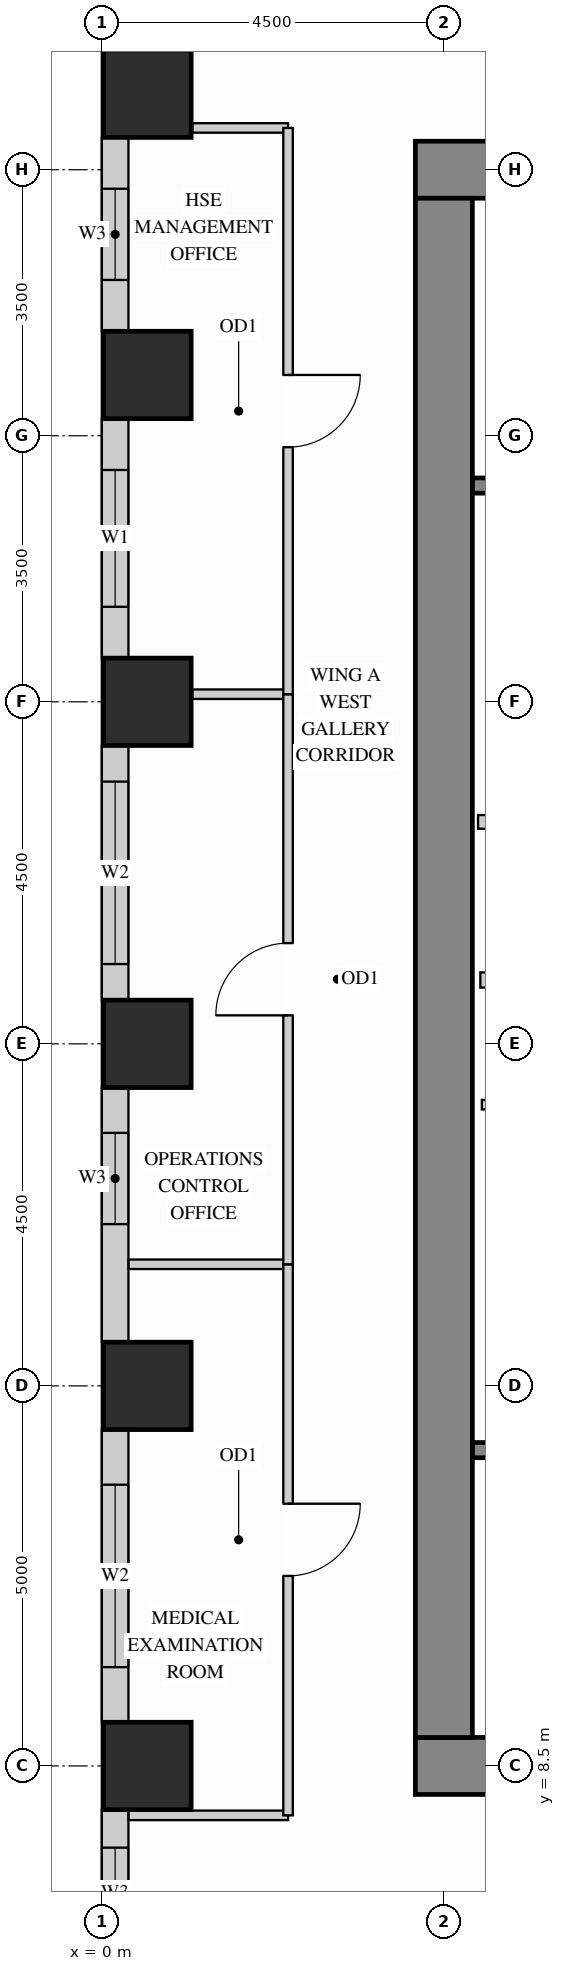
"""IFC4 building model, lengths in metres.
Left out: names, types, materials, properties, quantities, classifications, styles, units other than length and angle.
Written with IfcOpenShell. Run it as: python <this file> out.ifc"""

import sys

from ifc_helpers import new_model, si_unit, direction, frame, frame_2d, origin, origin_2d, place, context, subcontext, project, spatial, rectangle, extrude, source, transform, mapped, element, fill, save


model = new_model("IFC4")
c1 = context("Model", 3, precision=1e-05, world=origin(), true_north=direction((0.0, 1.0)))
c2 = subcontext(c1, "Body", "Model", "MODEL_VIEW")
j1 = project(units=[si_unit("LENGTHUNIT", "METRE"), si_unit("PLANEANGLEUNIT", "RADIAN")], contexts=[c1])
p1 = place(None, origin())
s1 = spatial("IfcSite", under=j1, at=p1, CompositionType="ELEMENT")
p2 = place(p1, origin())
s2 = spatial("IfcBuilding", under=s1, at=p2, CompositionType="ELEMENT")
p3 = place(p2, frame((0.0, 0.0, 117.0)))
s3 = spatial("IfcBuildingStorey", under=s2, at=p3, CompositionType="ELEMENT", Elevation=117.0)
m1 = source(origin(), c2, "Body", "SweptSolid", [
    extrude(rectangle(XDim=1.15, YDim=1.15, at=origin_2d()), origin(), (0.0, 0.0, 1.0), 3.38),
])
for number, where, z_axis, x_axis in (
    (1, (0.6, 13.5, 0.0), (0.0, 0.0, 1.0), (1.0, 0.0, 0.0)),
    (2, (0.6, 18.0, 0.0), (0.0, 0.0, 1.0), (1.0, 0.0, 0.0)),
    (3, (0.6, 22.5, 0.0), (0.0, 0.0, 1.0), (1.0, 0.0, 0.0)),
    (4, (0.6, 26.8, 0.0), (0.0, 0.0, 1.0), (1.0, 0.0, 0.0)),
    (5, (0.6, 30.5, 0.0), (0.0, 0.0, 1.0), (1.0, 0.0, 0.0)),
    (6, (0.6, 8.5, 0.0), (0.0, 0.0, 1.0), (1.0, 0.0, 0.0)),
):
    element("IfcColumn", number, at=place(p3, frame(where, z_axis=z_axis, x_axis=x_axis)), inside=s3, PredefinedType="COLUMN", context=c2, shape_type="MappedRepresentation", body=[
        mapped(m1, transform((0.0, 0.0, 0.0), x_axis=(1.0, 0.0, 0.0), y_axis=(0.0, 1.0, 0.0), z_axis=(0.0, 0.0, 1.0))),
    ])
m2 = source(origin(), c2, "Body", "SweptSolid", [
    extrude(rectangle(XDim=10.75, YDim=0.75, at=frame_2d((5.375, 0.0))), origin(), (0.0, 0.0, 1.0), 3.38),
])
for number, where, z_axis, x_axis in (
    (7, (4.125, 29.5, 0.0), (0.0, 0.0, 1.0), (1.0, 0.0, 0.0)),
    (8, (4.125, 8.5, 0.0), (0.0, 0.0, 1.0), (1.0, 0.0, 0.0)),
):
    element("IfcWall", number, at=place(p3, frame(where, z_axis=z_axis, x_axis=x_axis)), inside=s3, PredefinedType="SHEAR", context=c2, shape_type="MappedRepresentation", body=[
        mapped(m2, transform((0.0, 0.0, 0.0), x_axis=(1.0, 0.0, 0.0), y_axis=(0.0, 1.0, 0.0), z_axis=(0.0, 0.0, 1.0))),
    ])
m3 = source(origin(), c2, "Body", "SweptSolid", [
    extrude(rectangle(XDim=20.25, YDim=0.75, at=frame_2d((10.125, 0.0))), origin(), (0.0, 0.0, 1.0), 3.38),
])
p4 = place(p3, frame((4.5, 8.875, 0.0), z_axis=(0.0, 0.0, 1.0), x_axis=(0.0, 1.0, 0.0)))
e9 = element("IfcWall", 9, at=p4, inside=s3, PredefinedType="SHEAR", context=c2, shape_type="MappedRepresentation", body=[
    mapped(m3, transform((0.0, 0.0, 0.0), x_axis=(1.0, 0.0, 0.0), y_axis=(0.0, 1.0, 0.0), z_axis=(0.0, 0.0, 1.0))),
])
p5 = place(p3, frame((0.175, 29.927, 0.0), z_axis=(0.0, 0.0, 1.0), x_axis=(0.0, -1.0, 0.0)))
e10 = element("IfcWall", 10, at=p5, inside=s3, PredefinedType="SOLIDWALL", context=c2, shape_type="SweptSolid", body=[
    extrude(rectangle(XDim=2.554, YDim=0.35, at=frame_2d((1.277, 0.0))), origin(), (0.0, 0.0, 1.0), 3.365),
])
p6 = place(p5, frame((0.677, 0.0, 0.78)))
e11 = element("IfcOpeningElement", 11, at=p6, cuts=e10, PredefinedType="OPENING", context=c2, shape_type="SweptSolid", body=[
    extrude(rectangle(XDim=1.2, YDim=2.1, at=frame_2d((0.6, 1.05))), frame((0.0, 0.185, 0.0), z_axis=(0.0, -1.0, 0.0), x_axis=(1.0, 0.0, 0.0)), (0.0, 0.0, 1.0), 0.37),
])
p7 = place(p3, frame((0.175, 26.227, 0.0), z_axis=(0.0, 0.0, 1.0), x_axis=(0.0, -1.0, 0.0)))
e12 = element("IfcWall", 12, at=p7, inside=s3, PredefinedType="SOLIDWALL", context=c2, shape_type="SweptSolid", body=[
    extrude(rectangle(XDim=3.154, YDim=0.35, at=frame_2d((1.577, 0.0))), origin(), (0.0, 0.0, 1.0), 3.365),
])
p8 = place(p7, frame((0.677, 0.0, 0.78)))
e13 = element("IfcOpeningElement", 13, at=p8, cuts=e12, PredefinedType="OPENING", context=c2, shape_type="SweptSolid", body=[
    extrude(rectangle(XDim=1.8, YDim=2.1, at=frame_2d((0.9, 1.05))), frame((0.0, 0.185, 0.0), z_axis=(0.0, -1.0, 0.0), x_axis=(1.0, 0.0, 0.0)), (0.0, 0.0, 1.0), 0.37),
])
p9 = place(p3, frame((0.175, 21.927, 0.0), z_axis=(0.0, 0.0, 1.0), x_axis=(0.0, -1.0, 0.0)))
e14 = element("IfcWall", 14, at=p9, inside=s3, PredefinedType="SOLIDWALL", context=c2, shape_type="SweptSolid", body=[
    extrude(rectangle(XDim=3.354, YDim=0.35, at=frame_2d((1.677, 0.0))), origin(), (0.0, 0.0, 1.0), 3.365),
])
p10 = place(p9, frame((0.477, 0.0, 0.78)))
e15 = element("IfcOpeningElement", 15, at=p10, cuts=e14, PredefinedType="OPENING", context=c2, shape_type="SweptSolid", body=[
    extrude(rectangle(XDim=2.4, YDim=2.1, at=frame_2d((1.2, 1.05))), frame((0.0, 0.185, 0.0), z_axis=(0.0, -1.0, 0.0), x_axis=(1.0, 0.0, 0.0)), (0.0, 0.0, 1.0), 0.37),
])
p11 = place(p3, frame((0.175, 17.427, 0.0), z_axis=(0.0, 0.0, 1.0), x_axis=(0.0, -1.0, 0.0)))
e16 = element("IfcWall", 16, at=p11, inside=s3, PredefinedType="SOLIDWALL", context=c2, shape_type="SweptSolid", body=[
    extrude(rectangle(XDim=3.354, YDim=0.35, at=frame_2d((1.677, 0.0))), origin(), (0.0, 0.0, 1.0), 3.365),
])
p12 = place(p11, frame((0.598, 0.0, 0.78)))
e17 = element("IfcOpeningElement", 17, at=p12, cuts=e16, PredefinedType="OPENING", context=c2, shape_type="SweptSolid", body=[
    extrude(rectangle(XDim=1.2, YDim=2.1, at=frame_2d((0.6, 1.05))), frame((0.0, 0.185, 0.0), z_axis=(0.0, -1.0, 0.0), x_axis=(1.0, 0.0, 0.0)), (0.0, 0.0, 1.0), 0.37),
])
p13 = place(p3, frame((0.175, 12.927, 0.0), z_axis=(0.0, 0.0, 1.0), x_axis=(0.0, -1.0, 0.0)))
e18 = element("IfcWall", 18, at=p13, inside=s3, PredefinedType="SOLIDWALL", context=c2, shape_type="SweptSolid", body=[
    extrude(rectangle(XDim=3.854, YDim=0.35, at=frame_2d((1.927, 0.0))), origin(), (0.0, 0.0, 1.0), 3.365),
])
p14 = place(p13, frame((0.727, 0.0, 0.78)))
e19 = element("IfcOpeningElement", 19, at=p14, cuts=e18, PredefinedType="OPENING", context=c2, shape_type="SweptSolid", body=[
    extrude(rectangle(XDim=2.4, YDim=2.1, at=frame_2d((1.2, 1.05))), frame((0.0, 0.185, 0.0), z_axis=(0.0, -1.0, 0.0), x_axis=(1.0, 0.0, 0.0)), (0.0, 0.0, 1.0), 0.37),
])
p15 = place(p3, frame((0.175, 7.927, 0.0), z_axis=(0.0, 0.0, 1.0), x_axis=(0.0, -1.0, 0.0)))
e20 = element("IfcWall", 20, at=p15, inside=s3, PredefinedType="SOLIDWALL", context=c2, shape_type="SweptSolid", body=[
    extrude(rectangle(XDim=3.854, YDim=0.35, at=frame_2d((1.927, 0.0))), origin(), (0.0, 0.0, 1.0), 3.365),
])
p16 = place(p15, frame((0.502, 0.0, 0.78)))
e21 = element("IfcOpeningElement", 21, at=p16, cuts=e20, PredefinedType="OPENING", context=c2, shape_type="SweptSolid", body=[
    extrude(rectangle(XDim=1.2, YDim=2.1, at=frame_2d((0.6, 1.05))), frame((0.0, 0.185, 0.0), z_axis=(0.0, -1.0, 0.0), x_axis=(1.0, 0.0, 0.0)), (0.0, 0.0, 1.0), 0.37),
])
m4 = source(origin(), c2, "Body", "SweptSolid", [
    extrude(rectangle(XDim=2.2, YDim=0.18, at=frame_2d((1.1, 0.0))), origin(), (0.0, 0.0, 1.0), 3.365),
])
p17 = place(p3, frame((4.95, 20.92, 0.0), z_axis=(0.0, 0.0, 1.0), x_axis=(1.0, 0.0, 0.0)))
e22 = element("IfcWall", 22, at=p17, inside=s3, PredefinedType="PARTITIONING", context=c2, shape_type="MappedRepresentation", body=[
    mapped(m4, transform((0.0, 0.0, 0.0), x_axis=(1.0, 0.0, 0.0), y_axis=(0.0, 1.0, 0.0), z_axis=(0.0, 0.0, 1.0))),
])
p18 = place(p3, frame((5.0, 17.2, 0.0), z_axis=(0.0, 0.0, 1.0), x_axis=(1.0, 0.0, 0.0)))
e23 = element("IfcWall", 23, at=p18, inside=s3, PredefinedType="PARTITIONING", context=c2, shape_type="SweptSolid", body=[
    extrude(rectangle(XDim=2.4, YDim=0.125, at=frame_2d((1.2, 0.0))), origin(), (0.0, 0.0, 1.0), 3.365),
])
p19 = place(p18, frame((0.7, 0.0, 0.0)))
e24 = element("IfcOpeningElement", 24, at=p19, cuts=e23, PredefinedType="OPENING", context=c2, shape_type="SweptSolid", body=[
    extrude(rectangle(XDim=0.85, YDim=2.1, at=frame_2d((0.425, 1.05))), frame((0.0, 0.073, 0.0), z_axis=(0.0, -1.0, 0.0), x_axis=(1.0, 0.0, 0.0)), (0.0, 0.0, 1.0), 0.145),
])
m5 = source(origin(), c2, "Body", "SweptSolid", [
    extrude(rectangle(XDim=1.26, YDim=0.125, at=frame_2d((0.63, 0.0))), origin(), (0.0, 0.0, 1.0), 3.365),
])
p20 = place(p3, frame((1.19, 30.05, 0.0), z_axis=(0.0, 0.0, 1.0), x_axis=(1.0, 0.0, 0.0)))
e25 = element("IfcWall", 25, at=p20, inside=s3, PredefinedType="PARTITIONING", context=c2, shape_type="MappedRepresentation", body=[
    mapped(m5, transform((0.0, 0.0, 0.0), x_axis=(1.0, 0.0, 0.0), y_axis=(0.0, 1.0, 0.0), z_axis=(0.0, 0.0, 1.0))),
])
m6 = source(origin(), c2, "Body", "SweptSolid", [
    extrude(rectangle(XDim=2.098, YDim=0.125, at=frame_2d((1.049, 0.0))), origin(), (0.0, 0.0, 1.0), 3.365),
])
for number, where, z_axis, x_axis in (
    (26, (0.352, 7.85, 0.0), (0.0, 0.0, 1.0), (1.0, 0.0, 0.0)),
    (27, (0.352, 15.1, 0.0), (0.0, 0.0, 1.0), (1.0, 0.0, 0.0)),
):
    element("IfcWall", number, at=place(p3, frame(where, z_axis=z_axis, x_axis=x_axis)), inside=s3, PredefinedType="PARTITIONING", context=c2, shape_type="MappedRepresentation", body=[
        mapped(m6, transform((0.0, 0.0, 0.0), x_axis=(1.0, 0.0, 0.0), y_axis=(0.0, 1.0, 0.0), z_axis=(0.0, 0.0, 1.0))),
    ])
p21 = place(p3, frame((1.19, 22.6, 0.0), z_axis=(0.0, 0.0, 1.0), x_axis=(1.0, 0.0, 0.0)))
e28 = element("IfcWall", 28, at=p21, inside=s3, PredefinedType="PARTITIONING", context=c2, shape_type="MappedRepresentation", body=[
    mapped(m5, transform((0.0, 0.0, 0.0), x_axis=(1.0, 0.0, 0.0), y_axis=(0.0, 1.0, 0.0), z_axis=(0.0, 0.0, 1.0))),
])
p22 = place(p3, frame((2.45, 7.85, 0.0), z_axis=(0.0, 0.0, 1.0), x_axis=(0.0, 1.0, 0.0)))
e29 = element("IfcWall", 29, at=p22, inside=s3, PredefinedType="PARTITIONING", context=c2, shape_type="SweptSolid", body=[
    extrude(rectangle(XDim=7.25, YDim=0.125, at=frame_2d((3.625, 0.0))), origin(), (0.0, 0.0, 1.0), 3.365),
])
p23 = place(p22, frame((3.15, 0.0, 0.0)))
e30 = element("IfcOpeningElement", 30, at=p23, cuts=e29, PredefinedType="OPENING", context=c2, shape_type="SweptSolid", body=[
    extrude(rectangle(XDim=0.95, YDim=2.15, at=frame_2d((0.475, 1.075))), frame((0.0, 0.073, 0.0), z_axis=(0.0, -1.0, 0.0), x_axis=(1.0, 0.0, 0.0)), (0.0, 0.0, 1.0), 0.145),
])
p24 = place(p3, frame((2.45, 15.1, 0.0), z_axis=(0.0, 0.0, 1.0), x_axis=(0.0, 1.0, 0.0)))
e31 = element("IfcWall", 31, at=p24, inside=s3, PredefinedType="PARTITIONING", context=c2, shape_type="SweptSolid", body=[
    extrude(rectangle(XDim=7.5, YDim=0.125, at=frame_2d((3.75, 0.0))), origin(), (0.0, 0.0, 1.0), 3.365),
])
p25 = place(p24, frame((3.275, 0.0, 0.0)))
e32 = element("IfcOpeningElement", 32, at=p25, cuts=e31, PredefinedType="OPENING", context=c2, shape_type="SweptSolid", body=[
    extrude(rectangle(XDim=0.95, YDim=2.15, at=frame_2d((0.475, 1.075))), frame((0.0, 0.073, 0.0), z_axis=(0.0, -1.0, 0.0), x_axis=(1.0, 0.0, 0.0)), (0.0, 0.0, 1.0), 0.145),
])
p26 = place(p3, frame((2.45, 22.6, 0.0), z_axis=(0.0, 0.0, 1.0), x_axis=(0.0, 1.0, 0.0)))
e33 = element("IfcWall", 33, at=p26, inside=s3, PredefinedType="PARTITIONING", context=c2, shape_type="SweptSolid", body=[
    extrude(rectangle(XDim=7.45, YDim=0.125, at=frame_2d((3.725, 0.0))), origin(), (0.0, 0.0, 1.0), 3.365),
])
p27 = place(p26, frame((3.25, 0.0, 0.0)))
e34 = element("IfcOpeningElement", 34, at=p27, cuts=e33, PredefinedType="OPENING", context=c2, shape_type="SweptSolid", body=[
    extrude(rectangle(XDim=0.95, YDim=2.15, at=frame_2d((0.475, 1.075))), frame((0.0, 0.073, 0.0), z_axis=(0.0, -1.0, 0.0), x_axis=(1.0, 0.0, 0.0)), (0.0, 0.0, 1.0), 0.145),
])
m7 = source(origin(), c2, "Body", "SweptSolid", [
    extrude(rectangle(XDim=2.09, YDim=0.2, at=frame_2d((1.045, 0.0))), origin(), (0.0, 0.0, 1.0), 3.365),
])
p28 = place(p3, frame((4.98, 18.84, 0.0), z_axis=(0.0, 0.0, 1.0), x_axis=(1.0, 0.0, 0.0)))
e35 = element("IfcWall", 35, at=p28, inside=s3, PredefinedType="PARTITIONING", context=c2, shape_type="MappedRepresentation", body=[
    mapped(m7, transform((0.0, 0.0, 0.0), x_axis=(1.0, 0.0, 0.0), y_axis=(0.0, 1.0, 0.0), z_axis=(0.0, 0.0, 1.0))),
])
p29 = place(p3, frame((4.877, 12.655, 0.0), z_axis=(0.0, 0.0, 1.0), x_axis=(1.0, 0.0, 0.0)))
e36 = element("IfcWall", 36, at=p29, inside=s3, PredefinedType="SHEAR", context=c2, shape_type="SweptSolid", body=[
    extrude(rectangle(XDim=7.528, YDim=0.2, at=frame_2d((3.764, 0.0))), origin(), (0.0, 0.0, 1.0), 3.38),
])
p30 = place(p29, frame((0.4, 0.0, 0.0)))
e37 = element("IfcOpeningElement", 37, at=p30, cuts=e36, PredefinedType="OPENING", context=c2, shape_type="SweptSolid", body=[
    extrude(rectangle(XDim=1.1, YDim=2.15, at=frame_2d((0.55, 1.075))), frame((0.0, 0.11, 0.0), z_axis=(0.0, -1.0, 0.0), x_axis=(1.0, 0.0, 0.0)), (0.0, 0.0, 1.0), 0.22),
])
p31 = place(p3, frame((4.877, 25.345, 0.0), z_axis=(0.0, 0.0, 1.0), x_axis=(1.0, 0.0, 0.0)))
e38 = element("IfcWall", 38, at=p31, inside=s3, PredefinedType="SHEAR", context=c2, shape_type="SweptSolid", body=[
    extrude(rectangle(XDim=7.528, YDim=0.2, at=frame_2d((3.764, 0.0))), origin(), (0.0, 0.0, 1.0), 3.38),
])
p32 = place(p31, frame((0.4, 0.0, 0.0)))
e39 = element("IfcOpeningElement", 39, at=p32, cuts=e38, PredefinedType="OPENING", context=c2, shape_type="SweptSolid", body=[
    extrude(rectangle(XDim=1.1, YDim=2.15, at=frame_2d((0.55, 1.075))), frame((0.0, 0.11, 0.0), z_axis=(0.0, -1.0, 0.0), x_axis=(1.0, 0.0, 0.0)), (0.0, 0.0, 1.0), 0.22),
])
m8 = source(origin(), c2, "Body", "SweptSolid", [
    extrude(rectangle(XDim=0.95, YDim=2.15, at=frame_2d((0.475, 1.075))), frame((0.0, 0.025, 0.0), z_axis=(0.0, -1.0, 0.0), x_axis=(1.0, 0.0, 0.0)), (0.0, 0.0, 1.0), 0.05),
])
p33 = place(p23, origin())
e40 = element("IfcDoor", 40, at=p33, inside=s3, OperationType="SINGLE_SWING_RIGHT", PredefinedType="DOOR", context=c2, shape_type="MappedRepresentation", body=[
    mapped(m8, transform((0.0, 0.0, 0.0), x_axis=(1.0, 0.0, 0.0), y_axis=(0.0, 1.0, 0.0), z_axis=(0.0, 0.0, 1.0))),
])
fill(e30, e40)
p34 = place(p25, origin())
e41 = element("IfcDoor", 41, at=p34, inside=s3, OperationType="SINGLE_SWING_LEFT", PredefinedType="DOOR", context=c2, shape_type="MappedRepresentation", body=[
    mapped(m8, transform((0.0, 0.0, 0.0), x_axis=(1.0, 0.0, 0.0), y_axis=(0.0, 1.0, 0.0), z_axis=(0.0, 0.0, 1.0))),
])
fill(e32, e41)
p35 = place(p27, origin())
e42 = element("IfcDoor", 42, at=p35, inside=s3, OperationType="SINGLE_SWING_RIGHT", PredefinedType="DOOR", context=c2, shape_type="MappedRepresentation", body=[
    mapped(m8, transform((0.0, 0.0, 0.0), x_axis=(1.0, 0.0, 0.0), y_axis=(0.0, 1.0, 0.0), z_axis=(0.0, 0.0, 1.0))),
])
fill(e34, e42)
m9 = source(origin(), c2, "Body", "SweptSolid", [
    extrude(rectangle(XDim=1.8, YDim=2.1, at=frame_2d((0.9, 1.05))), frame((0.0, 0.03, 0.0), z_axis=(0.0, -1.0, 0.0), x_axis=(1.0, 0.0, 0.0)), (0.0, 0.0, 1.0), 0.06),
])
p36 = place(p8, origin())
e43 = element("IfcWindow", 43, at=p36, inside=s3, PartitioningType="SINGLE_PANEL", PredefinedType="WINDOW", context=c2, shape_type="MappedRepresentation", body=[
    mapped(m9, transform((0.0, 0.0, 0.0), x_axis=(1.0, 0.0, 0.0), y_axis=(0.0, 1.0, 0.0), z_axis=(0.0, 0.0, 1.0))),
])
fill(e13, e43)
m10 = source(origin(), c2, "Body", "SweptSolid", [
    extrude(rectangle(XDim=2.4, YDim=2.1, at=frame_2d((1.2, 1.05))), frame((0.0, 0.03, 0.0), z_axis=(0.0, -1.0, 0.0), x_axis=(1.0, 0.0, 0.0)), (0.0, 0.0, 1.0), 0.06),
])
p37 = place(p10, origin())
e44 = element("IfcWindow", 44, at=p37, inside=s3, PartitioningType="SINGLE_PANEL", PredefinedType="WINDOW", context=c2, shape_type="MappedRepresentation", body=[
    mapped(m10, transform((0.0, 0.0, 0.0), x_axis=(1.0, 0.0, 0.0), y_axis=(0.0, 1.0, 0.0), z_axis=(0.0, 0.0, 1.0))),
])
fill(e15, e44)
p38 = place(p14, origin())
e45 = element("IfcWindow", 45, at=p38, inside=s3, PartitioningType="SINGLE_PANEL", PredefinedType="WINDOW", context=c2, shape_type="MappedRepresentation", body=[
    mapped(m10, transform((0.0, 0.0, 0.0), x_axis=(1.0, 0.0, 0.0), y_axis=(0.0, 1.0, 0.0), z_axis=(0.0, 0.0, 1.0))),
])
fill(e19, e45)
m11 = source(origin(), c2, "Body", "SweptSolid", [
    extrude(rectangle(XDim=1.2, YDim=2.1, at=frame_2d((0.6, 1.05))), frame((0.0, 0.03, 0.0), z_axis=(0.0, -1.0, 0.0), x_axis=(1.0, 0.0, 0.0)), (0.0, 0.0, 1.0), 0.06),
])
p39 = place(p6, origin())
e46 = element("IfcWindow", 46, at=p39, inside=s3, PartitioningType="SINGLE_PANEL", PredefinedType="WINDOW", context=c2, shape_type="MappedRepresentation", body=[
    mapped(m11, transform((0.0, 0.0, 0.0), x_axis=(1.0, 0.0, 0.0), y_axis=(0.0, 1.0, 0.0), z_axis=(0.0, 0.0, 1.0))),
])
fill(e11, e46)
p40 = place(p12, origin())
e47 = element("IfcWindow", 47, at=p40, inside=s3, PartitioningType="SINGLE_PANEL", PredefinedType="WINDOW", context=c2, shape_type="MappedRepresentation", body=[
    mapped(m11, transform((0.0, 0.0, 0.0), x_axis=(1.0, 0.0, 0.0), y_axis=(0.0, 1.0, 0.0), z_axis=(0.0, 0.0, 1.0))),
])
fill(e17, e47)
p41 = place(p16, origin())
e48 = element("IfcWindow", 48, at=p41, inside=s3, PartitioningType="SINGLE_PANEL", PredefinedType="WINDOW", context=c2, shape_type="MappedRepresentation", body=[
    mapped(m11, transform((0.0, 0.0, 0.0), x_axis=(1.0, 0.0, 0.0), y_axis=(0.0, 1.0, 0.0), z_axis=(0.0, 0.0, 1.0))),
])
fill(e21, e48)
save(model, sys.argv[1])
